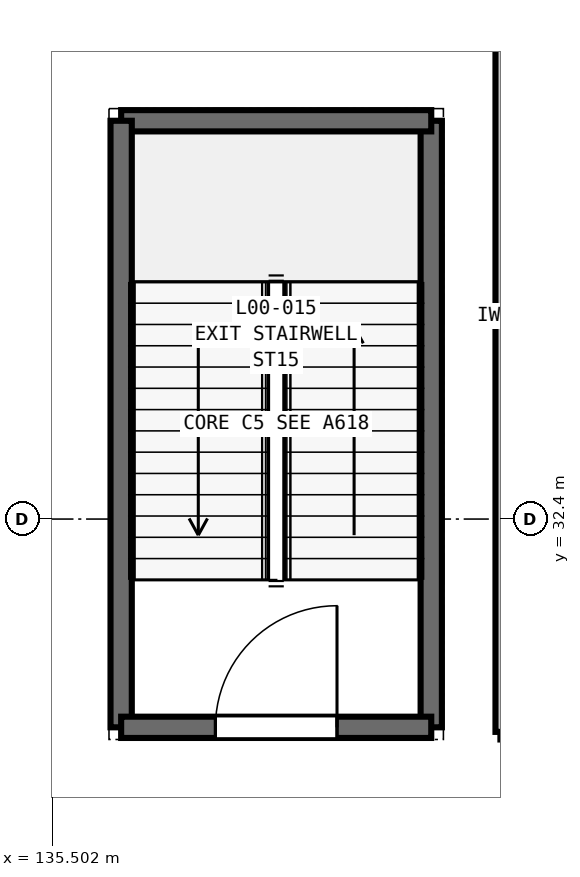
"""IFC4 building model, lengths in metres.
Left out: names, types, materials, properties, quantities, classifications, styles, units other than length and angle.
Written with IfcOpenShell. Run it as: python <this file> out.ifc"""

import sys

from ifc_helpers import new_model, si_unit, direction, frame, frame_2d, origin, place, context, subcontext, project, spatial, rectangle, extrude, element, fill, save


model = new_model("IFC4")
c1 = context("Model", 3, precision=1e-05, world=origin(), true_north=direction((0.0, 1.0)))
c2 = subcontext(c1, "Body", "Model", "MODEL_VIEW")
j1 = project(units=[si_unit("LENGTHUNIT", "METRE"), si_unit("PLANEANGLEUNIT", "RADIAN")], contexts=[c1])
p1 = place(None, origin())
s1 = spatial("IfcSite", under=j1, at=p1, CompositionType="ELEMENT")
p2 = place(p1, origin())
s2 = spatial("IfcBuilding", under=s1, at=p2, CompositionType="ELEMENT")
p3 = place(p2, origin())
s3 = spatial("IfcBuildingStorey", under=s2, at=p3, CompositionType="ELEMENT", Elevation=0.0)
p4 = place(p3, frame((140.49, 29.66, 0.0), z_axis=(0.0, 0.0, 1.0), x_axis=(0.0, 1.0, 0.0)))
e1 = element("IfcWall", 1, at=p4, inside=s3, PredefinedType="SHEAR", context=c2, shape_type="SweptSolid", body=[
    extrude(rectangle(XDim=7.98, YDim=0.28, at=frame_2d((3.99, 0.0))), origin(), (0.0, 0.0, 1.0), 5.4),
])
p5 = place(p3, frame((140.49, 37.64, 0.0), z_axis=(0.0, 0.0, 1.0), x_axis=(-1.0, 0.0, 0.0)))
e2 = element("IfcWall", 2, at=p5, inside=s3, PredefinedType="SHEAR", context=c2, shape_type="SweptSolid", body=[
    extrude(rectangle(XDim=4.08, YDim=0.28, at=frame_2d((2.04, 0.0))), origin(), (0.0, 0.0, 1.0), 5.4),
])
p6 = place(p3, frame((136.41, 37.64, 0.0), z_axis=(0.0, 0.0, 1.0), x_axis=(0.0, -1.0, 0.0)))
e3 = element("IfcWall", 3, at=p6, inside=s3, PredefinedType="SHEAR", context=c2, shape_type="SweptSolid", body=[
    extrude(rectangle(XDim=7.98, YDim=0.28, at=frame_2d((3.99, 0.0))), origin(), (0.0, 0.0, 1.0), 5.4),
])
p7 = place(p3, frame((136.41, 29.66, 0.0), z_axis=(0.0, 0.0, 1.0), x_axis=(1.0, 0.0, 0.0)))
e4 = element("IfcWall", 4, at=p7, inside=s3, PredefinedType="SHEAR", context=c2, shape_type="SweptSolid", body=[
    extrude(rectangle(XDim=4.08, YDim=0.28, at=frame_2d((2.04, 0.0))), origin(), (0.0, 0.0, 1.0), 5.4),
])
p8 = place(p7, frame((1.24, 0.0, 0.0)))
e5 = element("IfcOpeningElement", 5, at=p8, cuts=e4, PredefinedType="OPENING", context=c2, shape_type="SweptSolid", body=[
    extrude(rectangle(XDim=1.6, YDim=2.25, at=frame_2d((0.8, 1.125))), frame((0.0, 0.15, 0.0), z_axis=(0.0, -1.0, 0.0), x_axis=(1.0, 0.0, 0.0)), (0.0, 0.0, 1.0), 0.3),
])
p9 = place(p3, frame((141.4, 29.6, 0.0), z_axis=(0.0, 0.0, 1.0), x_axis=(1.0, 0.0, 0.0)))
e6 = element("IfcWall", 6, at=p9, inside=s3, PredefinedType="PARTITIONING", context=c2, shape_type="SweptSolid", body=[
    extrude(rectangle(XDim=9.8, YDim=0.2, at=frame_2d((4.9, 0.0))), origin(), (0.0, 0.0, 1.0), 5.04),
])
p10 = place(p9, frame((4.125, 0.0, 0.0)))
e7 = element("IfcOpeningElement", 7, at=p10, cuts=e6, PredefinedType="OPENING", context=c2, shape_type="SweptSolid", body=[
    extrude(rectangle(XDim=1.55, YDim=2.25, at=frame_2d((0.775, 1.125))), frame((0.0, 0.11, 0.0), z_axis=(0.0, -1.0, 0.0), x_axis=(1.0, 0.0, 0.0)), (0.0, 0.0, 1.0), 0.22),
])
p11 = place(p3, frame((141.4, 29.6, 0.0), z_axis=(0.0, 0.0, 1.0), x_axis=(0.0, 1.0, 0.0)))
e8 = element("IfcWall", 8, at=p11, inside=s3, PredefinedType="PARTITIONING", context=c2, shape_type="SweptSolid", body=[
    extrude(rectangle(XDim=10.94, YDim=0.13, at=frame_2d((5.47, 0.0))), origin(), (0.0, 0.0, 1.0), 5.04),
])
p12 = place(p8, origin())
e9 = element("IfcDoor", 9, at=p12, inside=s3, OperationType="SINGLE_SWING_RIGHT", PredefinedType="DOOR", context=c2, shape_type="SweptSolid", body=[
    extrude(rectangle(XDim=1.6, YDim=2.25, at=frame_2d((0.8, 1.125))), frame((0.0, 0.025, 0.0), z_axis=(0.0, -1.0, 0.0), x_axis=(1.0, 0.0, 0.0)), (0.0, 0.0, 1.0), 0.05),
])
fill(e5, e9)
save(model, sys.argv[1])
